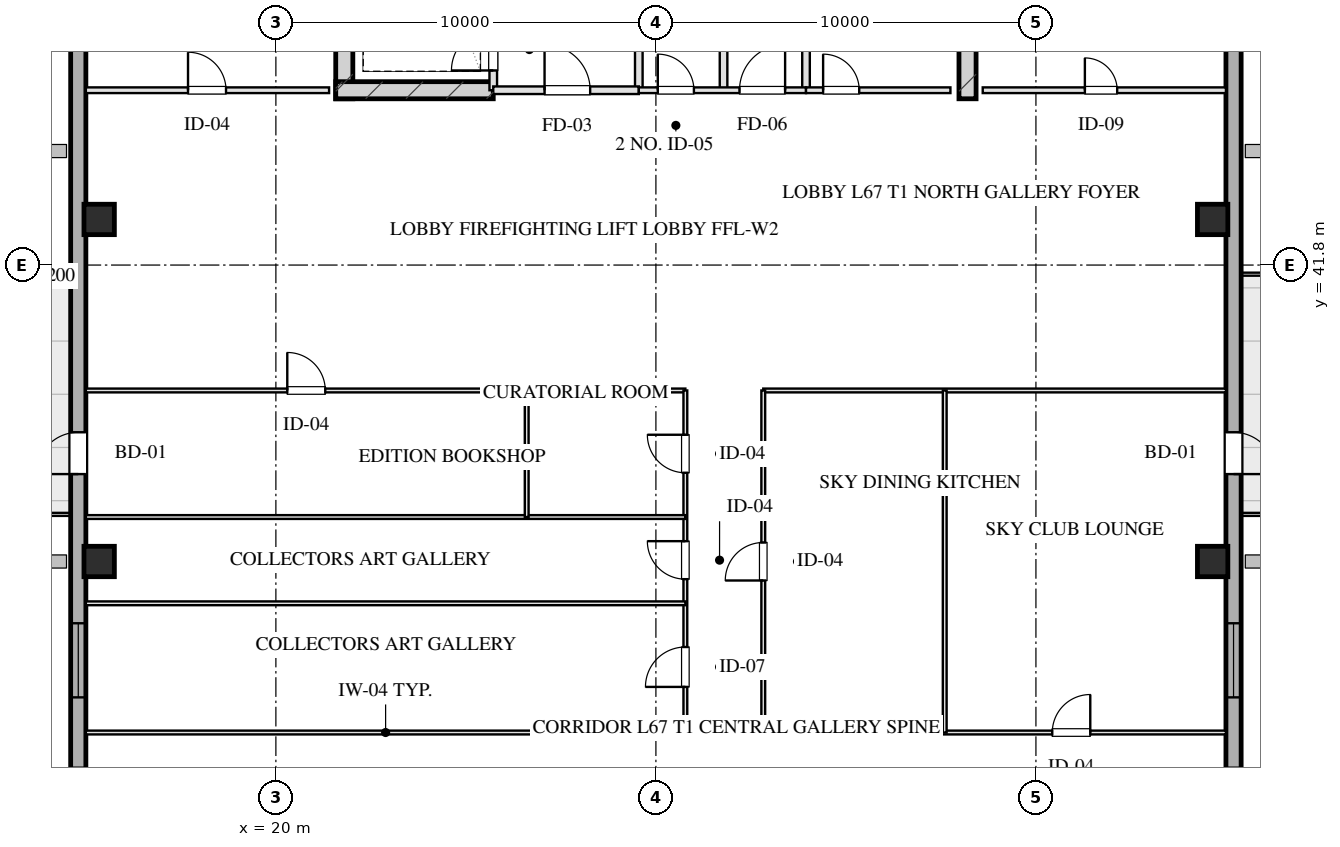
"""IFC4 building model, lengths in metres.
Left out: names, types, materials, properties, quantities, classifications, styles, units other than length and angle.
Written with IfcOpenShell. Run it as: python <this file> out.ifc"""

import sys

from ifc_helpers import new_model, si_unit, direction, frame, frame_2d, origin, origin_2d, place, context, subcontext, project, spatial, rectangle, hollow_rectangle, extrude, element, fill, save


model = new_model("IFC4")
c1 = context("Model", 3, precision=1e-05, world=origin(), true_north=direction((0.0, 1.0)))
c2 = subcontext(c1, "Body", "Model", "MODEL_VIEW")
j1 = project(units=[si_unit("LENGTHUNIT", "METRE"), si_unit("PLANEANGLEUNIT", "RADIAN")], contexts=[c1])
p1 = place(None, origin())
s1 = spatial("IfcSite", under=j1, at=p1, CompositionType="ELEMENT")
p2 = place(p1, origin())
s2 = spatial("IfcBuilding", under=s1, at=p2, CompositionType="ELEMENT")
p3 = place(p2, frame((0.0, 0.0, 247.2)))
s3 = spatial("IfcBuildingStorey", under=s2, at=p3, CompositionType="ELEMENT", Elevation=247.2)
for number, where, z_axis, x_axis in (
    (1, (21.8, 46.175, 0.0), (0.0, 0.0, 1.0), (0.0, 1.0, 0.0)),
    (2, (38.2, 46.175, 0.0), (0.0, 0.0, 1.0), (0.0, 1.0, 0.0)),
):
    element("IfcWall", number, at=place(p3, frame(where, z_axis=z_axis, x_axis=x_axis)), inside=s3, PredefinedType="SHEAR", context=c2, shape_type="SweptSolid", body=[
        extrude(rectangle(XDim=9.33, YDim=0.45, at=frame_2d((4.665, 0.0))), origin(), (0.0, 0.0, 1.0), 3.2),
    ])
p4 = place(p3, frame((21.575, 46.4, 0.0), z_axis=(0.0, 0.0, 1.0), x_axis=(1.0, 0.0, 0.0)))
e3 = element("IfcWall", 3, at=p4, inside=s3, PredefinedType="SHEAR", context=c2, shape_type="SweptSolid", body=[
    extrude(rectangle(XDim=4.145, YDim=0.45, at=frame_2d((2.073, 0.0))), origin(), (0.0, 0.0, 1.0), 3.2),
])
for number, where, z_axis, x_axis in (
    (4, (15.35, 34.0, 0.0), (0.0, 0.0, 1.0), (1.0, 0.0, 0.0)),
    (5, (15.35, 43.0, 0.0), (0.0, 0.0, 1.0), (1.0, 0.0, 0.0)),
    (6, (44.65, 34.0, 0.0), (0.0, 0.0, 1.0), (1.0, 0.0, 0.0)),
    (7, (44.65, 43.0, 0.0), (0.0, 0.0, 1.0), (1.0, 0.0, 0.0)),
):
    element("IfcColumn", number, at=place(p3, frame(where, z_axis=z_axis, x_axis=x_axis)), inside=s3, PredefinedType="COLUMN", context=c2, shape_type="SweptSolid", body=[
        extrude(hollow_rectangle(XDim=0.8, YDim=0.8, WallThickness=0.028, at=origin_2d()), origin(), (0.0, 0.0, 1.0), 3.201),
    ])
p5 = place(p3, frame((14.8, 13.1, 0.0), z_axis=(0.0, 0.0, 1.0), x_axis=(0.0, 1.0, 0.0)))
e8 = element("IfcWall", 8, at=p5, inside=s3, PredefinedType="SOLIDWALL", context=c2, shape_type="SweptSolid", body=[
    extrude(rectangle(XDim=41.8, YDim=0.4, at=frame_2d((20.9, 0.0))), origin(), (0.0, 0.0, 1.0), 2.36),
])
p6 = place(p5, frame((13.525, 0.0, 0.75)))
e9 = element("IfcOpeningElement", 9, at=p6, cuts=e8, PredefinedType="OPENING", context=c2, shape_type="SweptSolid", body=[
    extrude(rectangle(XDim=1.95, YDim=1.21, at=frame_2d((0.975, 0.605))), frame((0.0, 0.21, 0.0), z_axis=(0.0, -1.0, 0.0), x_axis=(1.0, 0.0, 0.0)), (0.0, 0.0, 1.0), 0.42),
])
p7 = place(p5, frame((17.325, 0.0, 0.75)))
e10 = element("IfcOpeningElement", 10, at=p7, cuts=e8, PredefinedType="OPENING", context=c2, shape_type="SweptSolid", body=[
    extrude(rectangle(XDim=1.95, YDim=1.21, at=frame_2d((0.975, 0.605))), frame((0.0, 0.21, 0.0), z_axis=(0.0, -1.0, 0.0), x_axis=(1.0, 0.0, 0.0)), (0.0, 0.0, 1.0), 0.42),
])
p8 = place(p5, frame((23.2, 0.0, 0.0)))
e11 = element("IfcOpeningElement", 11, at=p8, cuts=e8, PredefinedType="OPENING", context=c2, shape_type="SweptSolid", body=[
    extrude(rectangle(XDim=1.1, YDim=2.15, at=frame_2d((0.55, 1.075))), frame((0.0, 0.21, 0.0), z_axis=(0.0, -1.0, 0.0), x_axis=(1.0, 0.0, 0.0)), (0.0, 0.0, 1.0), 0.42),
])
p9 = place(p3, frame((45.2, 54.9, 0.0), z_axis=(0.0, 0.0, 1.0), x_axis=(0.0, -1.0, 0.0)))
e12 = element("IfcWall", 12, at=p9, inside=s3, PredefinedType="SOLIDWALL", context=c2, shape_type="SweptSolid", body=[
    extrude(rectangle(XDim=41.8, YDim=0.4, at=frame_2d((20.9, 0.0))), origin(), (0.0, 0.0, 1.0), 2.36),
])
p10 = place(p9, frame((26.325, 0.0, 0.75)))
e13 = element("IfcOpeningElement", 13, at=p10, cuts=e12, PredefinedType="OPENING", context=c2, shape_type="SweptSolid", body=[
    extrude(rectangle(XDim=1.95, YDim=1.21, at=frame_2d((0.975, 0.605))), frame((0.0, 0.21, 0.0), z_axis=(0.0, -1.0, 0.0), x_axis=(1.0, 0.0, 0.0)), (0.0, 0.0, 1.0), 0.42),
])
p11 = place(p9, frame((22.525, 0.0, 0.75)))
e14 = element("IfcOpeningElement", 14, at=p11, cuts=e12, PredefinedType="OPENING", context=c2, shape_type="SweptSolid", body=[
    extrude(rectangle(XDim=1.95, YDim=1.21, at=frame_2d((0.975, 0.605))), frame((0.0, 0.21, 0.0), z_axis=(0.0, -1.0, 0.0), x_axis=(1.0, 0.0, 0.0)), (0.0, 0.0, 1.0), 0.42),
])
p12 = place(p9, frame((17.5, 0.0, 0.0)))
e15 = element("IfcOpeningElement", 15, at=p12, cuts=e12, PredefinedType="OPENING", context=c2, shape_type="SweptSolid", body=[
    extrude(rectangle(XDim=1.1, YDim=2.15, at=frame_2d((0.55, 1.075))), frame((0.0, 0.21, 0.0), z_axis=(0.0, -1.0, 0.0), x_axis=(1.0, 0.0, 0.0)), (0.0, 0.0, 1.0), 0.42),
])
p13 = place(p3, frame((25.72, 46.4, 0.0), z_axis=(0.0, 0.0, 1.0), x_axis=(0.0, 1.0, 0.0)))
e16 = element("IfcWall", 16, at=p13, inside=s3, PredefinedType="PARTITIONING", context=c2, shape_type="SweptSolid", body=[
    extrude(rectangle(XDim=1.9, YDim=0.2, at=frame_2d((0.95, 0.0))), origin(), (0.0, 0.0, 1.0), 2.925),
])
p14 = place(p13, frame((0.52, 0.0, 0.0)))
e17 = element("IfcOpeningElement", 17, at=p14, cuts=e16, PredefinedType="OPENING", context=c2, shape_type="SweptSolid", body=[
    extrude(rectangle(XDim=1.1, YDim=2.05, at=frame_2d((0.55, 1.025))), frame((0.0, 0.11, 0.0), z_axis=(0.0, -1.0, 0.0), x_axis=(1.0, 0.0, 0.0)), (0.0, 0.0, 1.0), 0.22),
])
p15 = place(p3, frame((29.55, 46.4, 0.0), z_axis=(0.0, 0.0, 1.0), x_axis=(0.0, 1.0, 0.0)))
e18 = element("IfcWall", 18, at=p15, inside=s3, PredefinedType="PARTITIONING", context=c2, shape_type="SweptSolid", body=[
    extrude(rectangle(XDim=8.43, YDim=0.2, at=frame_2d((4.215, 0.0))), origin(), (0.0, 0.0, 1.0), 2.925),
])
p16 = place(p3, frame((25.72, 46.4, 0.0), z_axis=(0.0, 0.0, 1.0), x_axis=(1.0, 0.0, 0.0)))
e19 = element("IfcWall", 19, at=p16, inside=s3, PredefinedType="PARTITIONING", context=c2, shape_type="SweptSolid", body=[
    extrude(rectangle(XDim=3.83, YDim=0.2, at=frame_2d((1.915, 0.0))), origin(), (0.0, 0.0, 1.0), 2.925),
])
p17 = place(p16, frame((1.35, 0.0, 0.0)))
e20 = element("IfcOpeningElement", 20, at=p17, cuts=e19, PredefinedType="OPENING", context=c2, shape_type="SweptSolid", body=[
    extrude(rectangle(XDim=1.2, YDim=2.05, at=frame_2d((0.6, 1.025))), frame((0.0, 0.11, 0.0), z_axis=(0.0, -1.0, 0.0), x_axis=(1.0, 0.0, 0.0)), (0.0, 0.0, 1.0), 0.22),
])
for number, where, z_axis, x_axis in (
    (21, (33.95, 46.4, 0.0), (0.0, 0.0, 1.0), (0.0, 1.0, 0.0)),
    (22, (31.78, 46.4, 0.0), (0.0, 0.0, 1.0), (0.0, 1.0, 0.0)),
):
    element("IfcWall", number, at=place(p3, frame(where, z_axis=z_axis, x_axis=x_axis)), inside=s3, PredefinedType="PARTITIONING", context=c2, shape_type="SweptSolid", body=[
        extrude(rectangle(XDim=8.43, YDim=0.2, at=frame_2d((4.215, 0.0))), origin(), (0.0, 0.0, 1.0), 2.925),
    ])
p18 = place(p3, frame((29.55, 46.4, 0.0), z_axis=(0.0, 0.0, 1.0), x_axis=(1.0, 0.0, 0.0)))
e23 = element("IfcWall", 23, at=p18, inside=s3, PredefinedType="PARTITIONING", context=c2, shape_type="SweptSolid", body=[
    extrude(rectangle(XDim=4.4, YDim=0.15, at=frame_2d((2.2, 0.0))), origin(), (0.0, 0.0, 1.0), 2.925),
])
p19 = place(p18, frame((0.5, 0.0, 0.0)))
e24 = element("IfcOpeningElement", 24, at=p19, cuts=e23, PredefinedType="OPENING", context=c2, shape_type="SweptSolid", body=[
    extrude(rectangle(XDim=0.95, YDim=2.05, at=frame_2d((0.475, 1.025))), frame((0.0, 0.085, 0.0), z_axis=(0.0, -1.0, 0.0), x_axis=(1.0, 0.0, 0.0)), (0.0, 0.0, 1.0), 0.17),
])
p20 = place(p18, frame((2.65, 0.0, 0.0)))
e25 = element("IfcOpeningElement", 25, at=p20, cuts=e23, PredefinedType="OPENING", context=c2, shape_type="SweptSolid", body=[
    extrude(rectangle(XDim=1.2, YDim=2.05, at=frame_2d((0.6, 1.025))), frame((0.0, 0.085, 0.0), z_axis=(0.0, -1.0, 0.0), x_axis=(1.0, 0.0, 0.0)), (0.0, 0.0, 1.0), 0.17),
])
p21 = place(p3, frame((33.95, 46.4, 0.0), z_axis=(0.0, 0.0, 1.0), x_axis=(1.0, 0.0, 0.0)))
e26 = element("IfcWall", 26, at=p21, inside=s3, PredefinedType="PARTITIONING", context=c2, shape_type="SweptSolid", body=[
    extrude(rectangle(XDim=3.8, YDim=0.15, at=frame_2d((1.9, 0.0))), origin(), (0.0, 0.0, 1.0), 2.925),
])
p22 = place(p21, frame((0.45, 0.0, 0.0)))
e27 = element("IfcOpeningElement", 27, at=p22, cuts=e26, PredefinedType="OPENING", context=c2, shape_type="SweptSolid", body=[
    extrude(rectangle(XDim=0.95, YDim=2.05, at=frame_2d((0.475, 1.025))), frame((0.0, 0.085, 0.0), z_axis=(0.0, -1.0, 0.0), x_axis=(1.0, 0.0, 0.0)), (0.0, 0.0, 1.0), 0.17),
])
p23 = place(p3, frame((15.0, 46.4, 0.0), z_axis=(0.0, 0.0, 1.0), x_axis=(1.0, 0.0, 0.0)))
e28 = element("IfcWall", 28, at=p23, inside=s3, PredefinedType="PARTITIONING", context=c2, shape_type="SweptSolid", body=[
    extrude(rectangle(XDim=6.4, YDim=0.15, at=frame_2d((3.2, 0.0))), origin(), (0.0, 0.0, 1.0), 2.925),
])
p24 = place(p23, frame((2.688, 0.0, 0.0)))
e29 = element("IfcOpeningElement", 29, at=p24, cuts=e28, PredefinedType="OPENING", context=c2, shape_type="SweptSolid", body=[
    extrude(rectangle(XDim=1.0, YDim=2.05, at=frame_2d((0.5, 1.025))), frame((0.0, 0.085, 0.0), z_axis=(0.0, -1.0, 0.0), x_axis=(1.0, 0.0, 0.0)), (0.0, 0.0, 1.0), 0.17),
])
p25 = place(p3, frame((38.6, 46.4, 0.0), z_axis=(0.0, 0.0, 1.0), x_axis=(1.0, 0.0, 0.0)))
e30 = element("IfcWall", 30, at=p25, inside=s3, PredefinedType="PARTITIONING", context=c2, shape_type="SweptSolid", body=[
    extrude(rectangle(XDim=6.4, YDim=0.15, at=frame_2d((3.2, 0.0))), origin(), (0.0, 0.0, 1.0), 2.925),
])
p26 = place(p25, frame((2.688, 0.0, 0.0)))
e31 = element("IfcOpeningElement", 31, at=p26, cuts=e30, PredefinedType="OPENING", context=c2, shape_type="SweptSolid", body=[
    extrude(rectangle(XDim=0.85, YDim=2.05, at=frame_2d((0.425, 1.025))), frame((0.0, 0.085, 0.0), z_axis=(0.0, -1.0, 0.0), x_axis=(1.0, 0.0, 0.0)), (0.0, 0.0, 1.0), 0.17),
])
p27 = place(p3, frame((15.0, 29.5, 0.0), z_axis=(0.0, 0.0, 1.0), x_axis=(1.0, 0.0, 0.0)))
e32 = element("IfcWall", 32, at=p27, inside=s3, PredefinedType="MOVABLE", context=c2, shape_type="SweptSolid", body=[
    extrude(rectangle(XDim=15.775, YDim=0.1, at=frame_2d((7.887, 0.0))), origin(), (0.0, 0.0, 1.0), 2.925),
])
p28 = place(p3, frame((32.825, 29.5, 0.0), z_axis=(0.0, 0.0, 1.0), x_axis=(1.0, 0.0, 0.0)))
e33 = element("IfcWall", 33, at=p28, inside=s3, PredefinedType="MOVABLE", context=c2, shape_type="SweptSolid", body=[
    extrude(rectangle(XDim=12.175, YDim=0.1, at=frame_2d((6.087, 0.0))), origin(), (0.0, 0.0, 1.0), 2.925),
])
p29 = place(p28, frame((7.605, 0.0, 0.0)))
e34 = element("IfcOpeningElement", 34, at=p29, cuts=e33, PredefinedType="OPENING", context=c2, shape_type="SweptSolid", body=[
    extrude(rectangle(XDim=1.0, YDim=2.05, at=frame_2d((0.5, 1.025))), frame((0.0, 0.06, 0.0), z_axis=(0.0, -1.0, 0.0), x_axis=(1.0, 0.0, 0.0)), (0.0, 0.0, 1.0), 0.12),
])
p30 = place(p3, frame((15.0, 38.5, 0.0), z_axis=(0.0, 0.0, 1.0), x_axis=(1.0, 0.0, 0.0)))
e35 = element("IfcWall", 35, at=p30, inside=s3, PredefinedType="MOVABLE", context=c2, shape_type="SweptSolid", body=[
    extrude(rectangle(XDim=15.775, YDim=0.1, at=frame_2d((7.887, 0.0))), origin(), (0.0, 0.0, 1.0), 2.925),
])
p31 = place(p30, frame((5.3, 0.0, 0.0)))
e36 = element("IfcOpeningElement", 36, at=p31, cuts=e35, PredefinedType="OPENING", context=c2, shape_type="SweptSolid", body=[
    extrude(rectangle(XDim=1.0, YDim=2.05, at=frame_2d((0.5, 1.025))), frame((0.0, 0.06, 0.0), z_axis=(0.0, -1.0, 0.0), x_axis=(1.0, 0.0, 0.0)), (0.0, 0.0, 1.0), 0.12),
])
p32 = place(p3, frame((32.825, 38.5, 0.0), z_axis=(0.0, 0.0, 1.0), x_axis=(1.0, 0.0, 0.0)))
e37 = element("IfcWall", 37, at=p32, inside=s3, PredefinedType="MOVABLE", context=c2, shape_type="SweptSolid", body=[
    extrude(rectangle(XDim=12.175, YDim=0.1, at=frame_2d((6.087, 0.0))), origin(), (0.0, 0.0, 1.0), 2.925),
])
p33 = place(p3, frame((30.775, 29.5, 0.0), z_axis=(0.0, 0.0, 1.0), x_axis=(0.0, 1.0, 0.0)))
e38 = element("IfcWall", 38, at=p33, inside=s3, PredefinedType="MOVABLE", context=c2, shape_type="SweptSolid", body=[
    extrude(rectangle(XDim=9.0, YDim=0.1, at=frame_2d((4.5, 0.0))), origin(), (0.0, 0.0, 1.0), 2.925),
])
p34 = place(p33, frame((1.2, 0.0, 0.0)))
e39 = element("IfcOpeningElement", 39, at=p34, cuts=e38, PredefinedType="OPENING", context=c2, shape_type="SweptSolid", body=[
    extrude(rectangle(XDim=1.05, YDim=2.05, at=frame_2d((0.525, 1.025))), frame((0.0, 0.06, 0.0), z_axis=(0.0, -1.0, 0.0), x_axis=(1.0, 0.0, 0.0)), (0.0, 0.0, 1.0), 0.12),
])
p35 = place(p33, frame((4.035, 0.0, 0.0)))
e40 = element("IfcOpeningElement", 40, at=p35, cuts=e38, PredefinedType="OPENING", context=c2, shape_type="SweptSolid", body=[
    extrude(rectangle(XDim=1.0, YDim=2.05, at=frame_2d((0.5, 1.025))), frame((0.0, 0.06, 0.0), z_axis=(0.0, -1.0, 0.0), x_axis=(1.0, 0.0, 0.0)), (0.0, 0.0, 1.0), 0.12),
])
p36 = place(p33, frame((6.835, 0.0, 0.0)))
e41 = element("IfcOpeningElement", 41, at=p36, cuts=e38, PredefinedType="OPENING", context=c2, shape_type="SweptSolid", body=[
    extrude(rectangle(XDim=1.0, YDim=2.05, at=frame_2d((0.5, 1.025))), frame((0.0, 0.06, 0.0), z_axis=(0.0, -1.0, 0.0), x_axis=(1.0, 0.0, 0.0)), (0.0, 0.0, 1.0), 0.12),
])
p37 = place(p3, frame((32.825, 29.5, 0.0), z_axis=(0.0, 0.0, 1.0), x_axis=(0.0, 1.0, 0.0)))
e42 = element("IfcWall", 42, at=p37, inside=s3, PredefinedType="MOVABLE", context=c2, shape_type="SweptSolid", body=[
    extrude(rectangle(XDim=9.0, YDim=0.1, at=frame_2d((4.5, 0.0))), origin(), (0.0, 0.0, 1.0), 2.925),
])
p38 = place(p37, frame((4.0, 0.0, 0.0)))
e43 = element("IfcOpeningElement", 43, at=p38, cuts=e42, PredefinedType="OPENING", context=c2, shape_type="SweptSolid", body=[
    extrude(rectangle(XDim=1.0, YDim=2.05, at=frame_2d((0.5, 1.025))), frame((0.0, 0.06, 0.0), z_axis=(0.0, -1.0, 0.0), x_axis=(1.0, 0.0, 0.0)), (0.0, 0.0, 1.0), 0.12),
])
for number, where, z_axis, x_axis in (
    (44, (15.0, 32.9, 0.0), (0.0, 0.0, 1.0), (1.0, 0.0, 0.0)),
    (45, (15.0, 35.17, 0.0), (0.0, 0.0, 1.0), (1.0, 0.0, 0.0)),
):
    element("IfcWall", number, at=place(p3, frame(where, z_axis=z_axis, x_axis=x_axis)), inside=s3, PredefinedType="MOVABLE", context=c2, shape_type="SweptSolid", body=[
        extrude(rectangle(XDim=15.775, YDim=0.1, at=frame_2d((7.887, 0.0))), origin(), (0.0, 0.0, 1.0), 2.925),
    ])
p39 = place(p3, frame((26.6, 35.17, 0.0), z_axis=(0.0, 0.0, 1.0), x_axis=(0.0, 1.0, 0.0)))
e46 = element("IfcWall", 46, at=p39, inside=s3, PredefinedType="MOVABLE", context=c2, shape_type="SweptSolid", body=[
    extrude(rectangle(XDim=3.33, YDim=0.1, at=frame_2d((1.665, 0.0))), origin(), (0.0, 0.0, 1.0), 2.925),
])
p40 = place(p3, frame((37.6, 29.5, 0.0), z_axis=(0.0, 0.0, 1.0), x_axis=(0.0, 1.0, 0.0)))
e47 = element("IfcWall", 47, at=p40, inside=s3, PredefinedType="MOVABLE", context=c2, shape_type="SweptSolid", body=[
    extrude(rectangle(XDim=9.0, YDim=0.1, at=frame_2d((4.5, 0.0))), origin(), (0.0, 0.0, 1.0), 2.925),
])
p41 = place(p7, origin())
e48 = element("IfcWindow", 48, at=p41, inside=s3, PartitioningType="TRIPLE_PANEL_VERTICAL", PredefinedType="WINDOW", context=c2, shape_type="SweptSolid", body=[
    extrude(rectangle(XDim=1.95, YDim=1.21, at=frame_2d((0.975, 0.605))), frame((0.0, 0.03, 0.0), z_axis=(0.0, -1.0, 0.0), x_axis=(1.0, 0.0, 0.0)), (0.0, 0.0, 1.0), 0.06),
])
fill(e10, e48)
p42 = place(p11, origin())
e49 = element("IfcWindow", 49, at=p42, inside=s3, PartitioningType="TRIPLE_PANEL_VERTICAL", PredefinedType="WINDOW", context=c2, shape_type="SweptSolid", body=[
    extrude(rectangle(XDim=1.95, YDim=1.21, at=frame_2d((0.975, 0.605))), frame((0.0, 0.03, 0.0), z_axis=(0.0, -1.0, 0.0), x_axis=(1.0, 0.0, 0.0)), (0.0, 0.0, 1.0), 0.06),
])
fill(e14, e49)
p43 = place(p8, origin())
e50 = element("IfcDoor", 50, at=p43, inside=s3, OperationType="SINGLE_SWING_LEFT", PredefinedType="DOOR", context=c2, shape_type="SweptSolid", body=[
    extrude(rectangle(XDim=1.1, YDim=2.15, at=frame_2d((0.55, 1.075))), frame((0.0, 0.025, 0.0), z_axis=(0.0, -1.0, 0.0), x_axis=(1.0, 0.0, 0.0)), (0.0, 0.0, 1.0), 0.05),
])
fill(e11, e50)
p44 = place(p12, origin())
e51 = element("IfcDoor", 51, at=p44, inside=s3, OperationType="SINGLE_SWING_RIGHT", PredefinedType="DOOR", context=c2, shape_type="SweptSolid", body=[
    extrude(rectangle(XDim=1.1, YDim=2.15, at=frame_2d((0.55, 1.075))), frame((0.0, 0.025, 0.0), z_axis=(0.0, -1.0, 0.0), x_axis=(1.0, 0.0, 0.0)), (0.0, 0.0, 1.0), 0.05),
])
fill(e15, e51)
p45 = place(p14, origin())
e52 = element("IfcDoor", 52, at=p45, inside=s3, OperationType="SINGLE_SWING_LEFT", PredefinedType="DOOR", context=c2, shape_type="SweptSolid", body=[
    extrude(rectangle(XDim=1.1, YDim=2.05, at=frame_2d((0.55, 1.025))), frame((0.0, 0.025, 0.0), z_axis=(0.0, -1.0, 0.0), x_axis=(1.0, 0.0, 0.0)), (0.0, 0.0, 1.0), 0.05),
])
fill(e17, e52)
p46 = place(p17, origin())
e53 = element("IfcDoor", 53, at=p46, inside=s3, OperationType="SINGLE_SWING_LEFT", PredefinedType="DOOR", context=c2, shape_type="SweptSolid", body=[
    extrude(rectangle(XDim=1.2, YDim=2.05, at=frame_2d((0.6, 1.025))), frame((0.0, 0.025, 0.0), z_axis=(0.0, -1.0, 0.0), x_axis=(1.0, 0.0, 0.0)), (0.0, 0.0, 1.0), 0.05),
])
fill(e20, e53)
p47 = place(p19, origin())
e54 = element("IfcDoor", 54, at=p47, inside=s3, OperationType="SINGLE_SWING_LEFT", PredefinedType="DOOR", context=c2, shape_type="SweptSolid", body=[
    extrude(rectangle(XDim=0.95, YDim=2.05, at=frame_2d((0.475, 1.025))), frame((0.0, 0.025, 0.0), z_axis=(0.0, -1.0, 0.0), x_axis=(1.0, 0.0, 0.0)), (0.0, 0.0, 1.0), 0.05),
])
fill(e24, e54)
p48 = place(p20, origin())
e55 = element("IfcDoor", 55, at=p48, inside=s3, OperationType="SINGLE_SWING_RIGHT", PredefinedType="DOOR", context=c2, shape_type="SweptSolid", body=[
    extrude(rectangle(XDim=1.2, YDim=2.05, at=frame_2d((0.6, 1.025))), frame((0.0, 0.025, 0.0), z_axis=(0.0, -1.0, 0.0), x_axis=(1.0, 0.0, 0.0)), (0.0, 0.0, 1.0), 0.05),
])
fill(e25, e55)
p49 = place(p22, origin())
e56 = element("IfcDoor", 56, at=p49, inside=s3, OperationType="SINGLE_SWING_LEFT", PredefinedType="DOOR", context=c2, shape_type="SweptSolid", body=[
    extrude(rectangle(XDim=0.95, YDim=2.05, at=frame_2d((0.475, 1.025))), frame((0.0, 0.025, 0.0), z_axis=(0.0, -1.0, 0.0), x_axis=(1.0, 0.0, 0.0)), (0.0, 0.0, 1.0), 0.05),
])
fill(e27, e56)
p50 = place(p24, origin())
e57 = element("IfcDoor", 57, at=p50, inside=s3, OperationType="SINGLE_SWING_LEFT", PredefinedType="DOOR", context=c2, shape_type="SweptSolid", body=[
    extrude(rectangle(XDim=1.0, YDim=2.05, at=frame_2d((0.5, 1.025))), frame((0.0, 0.025, 0.0), z_axis=(0.0, -1.0, 0.0), x_axis=(1.0, 0.0, 0.0)), (0.0, 0.0, 1.0), 0.05),
])
fill(e29, e57)
p51 = place(p26, origin())
e58 = element("IfcDoor", 58, at=p51, inside=s3, OperationType="SINGLE_SWING_LEFT", PredefinedType="DOOR", context=c2, shape_type="SweptSolid", body=[
    extrude(rectangle(XDim=0.85, YDim=2.05, at=frame_2d((0.425, 1.025))), frame((0.0, 0.025, 0.0), z_axis=(0.0, -1.0, 0.0), x_axis=(1.0, 0.0, 0.0)), (0.0, 0.0, 1.0), 0.05),
])
fill(e31, e58)
p52 = place(p29, origin())
e59 = element("IfcDoor", 59, at=p52, inside=s3, OperationType="SINGLE_SWING_RIGHT", PredefinedType="DOOR", context=c2, shape_type="SweptSolid", body=[
    extrude(rectangle(XDim=1.0, YDim=2.05, at=frame_2d((0.5, 1.025))), frame((0.0, 0.025, 0.0), z_axis=(0.0, -1.0, 0.0), x_axis=(1.0, 0.0, 0.0)), (0.0, 0.0, 1.0), 0.05),
])
fill(e34, e59)
p53 = place(p31, origin())
e60 = element("IfcDoor", 60, at=p53, inside=s3, OperationType="SINGLE_SWING_LEFT", PredefinedType="DOOR", context=c2, shape_type="SweptSolid", body=[
    extrude(rectangle(XDim=1.0, YDim=2.05, at=frame_2d((0.5, 1.025))), frame((0.0, 0.025, 0.0), z_axis=(0.0, -1.0, 0.0), x_axis=(1.0, 0.0, 0.0)), (0.0, 0.0, 1.0), 0.05),
])
fill(e36, e60)
p54 = place(p34, origin())
e61 = element("IfcDoor", 61, at=p54, inside=s3, OperationType="SINGLE_SWING_LEFT", PredefinedType="DOOR", context=c2, shape_type="SweptSolid", body=[
    extrude(rectangle(XDim=1.05, YDim=2.05, at=frame_2d((0.525, 1.025))), frame((0.0, 0.025, 0.0), z_axis=(0.0, -1.0, 0.0), x_axis=(1.0, 0.0, 0.0)), (0.0, 0.0, 1.0), 0.05),
])
fill(e39, e61)
p55 = place(p35, origin())
e62 = element("IfcDoor", 62, at=p55, inside=s3, OperationType="SINGLE_SWING_RIGHT", PredefinedType="DOOR", context=c2, shape_type="SweptSolid", body=[
    extrude(rectangle(XDim=1.0, YDim=2.05, at=frame_2d((0.5, 1.025))), frame((0.0, 0.025, 0.0), z_axis=(0.0, -1.0, 0.0), x_axis=(1.0, 0.0, 0.0)), (0.0, 0.0, 1.0), 0.05),
])
fill(e40, e62)
p56 = place(p36, origin())
e63 = element("IfcDoor", 63, at=p56, inside=s3, OperationType="SINGLE_SWING_RIGHT", PredefinedType="DOOR", context=c2, shape_type="SweptSolid", body=[
    extrude(rectangle(XDim=1.0, YDim=2.05, at=frame_2d((0.5, 1.025))), frame((0.0, 0.025, 0.0), z_axis=(0.0, -1.0, 0.0), x_axis=(1.0, 0.0, 0.0)), (0.0, 0.0, 1.0), 0.05),
])
fill(e41, e63)
p57 = place(p38, origin())
e64 = element("IfcDoor", 64, at=p57, inside=s3, OperationType="SINGLE_SWING_LEFT", PredefinedType="DOOR", context=c2, shape_type="SweptSolid", body=[
    extrude(rectangle(XDim=1.0, YDim=2.05, at=frame_2d((0.5, 1.025))), frame((0.0, 0.025, 0.0), z_axis=(0.0, -1.0, 0.0), x_axis=(1.0, 0.0, 0.0)), (0.0, 0.0, 1.0), 0.05),
])
fill(e43, e64)
save(model, sys.argv[1])
